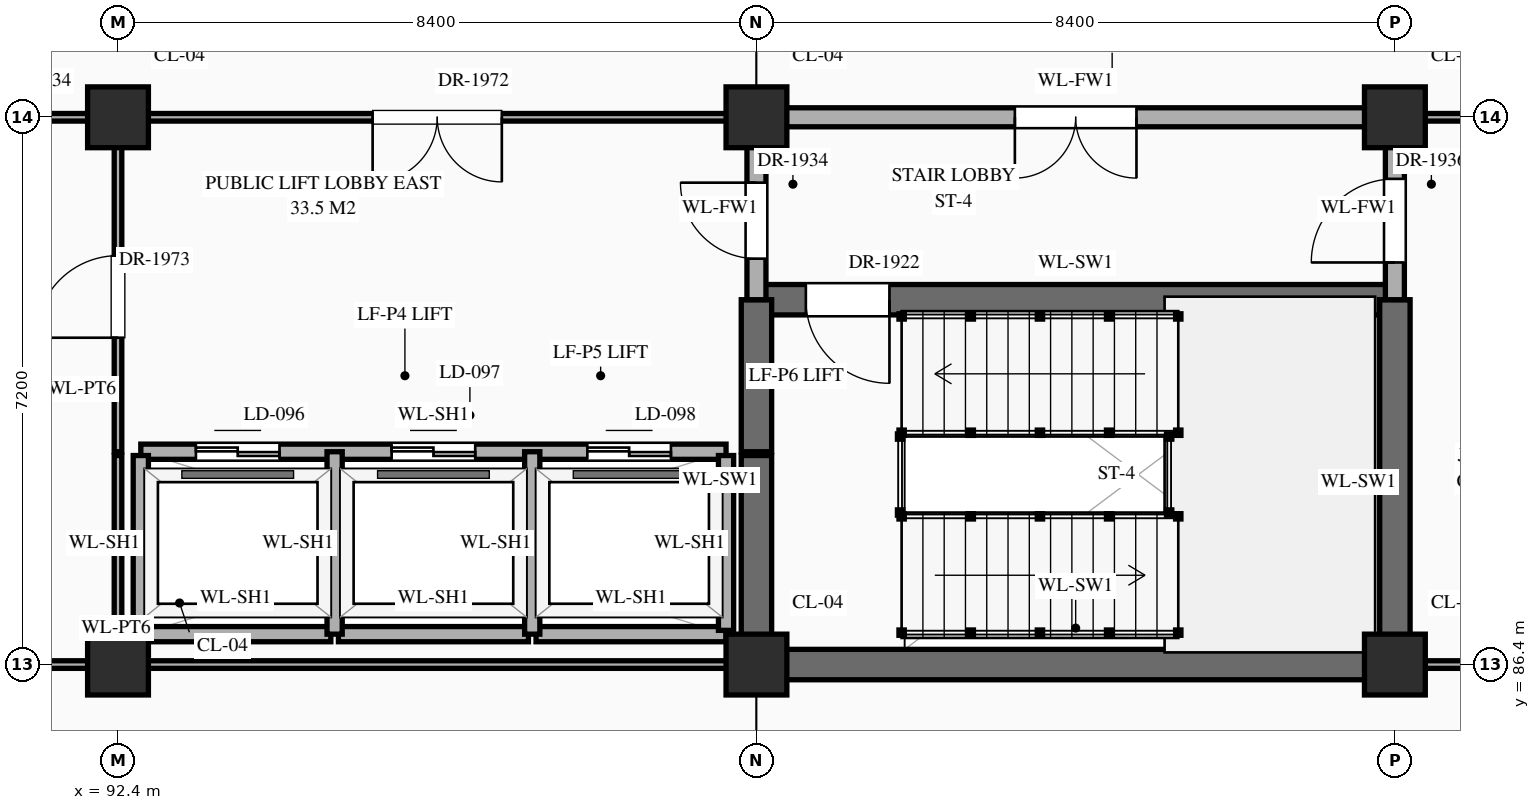
"""IFC4 building model, lengths in metres.
Left out: names, types, materials, properties, quantities, classifications, styles, units other than length and angle.
Written with IfcOpenShell. Run it as: python <this file> out.ifc"""

import sys

from ifc_helpers import new_model, si_unit, direction, frame, frame_2d, origin, origin_2d, place, context, subcontext, project, spatial, rectangle, extrude, element, fill, save


model = new_model("IFC4")
c1 = context("Model", 3, precision=1e-05, world=origin(), true_north=direction((0.0, 1.0)))
c2 = subcontext(c1, "Body", "Model", "MODEL_VIEW")
j1 = project(units=[si_unit("LENGTHUNIT", "METRE"), si_unit("PLANEANGLEUNIT", "RADIAN")], contexts=[c1])
p1 = place(None, origin())
s1 = spatial("IfcSite", under=j1, at=p1, CompositionType="ELEMENT")
p2 = place(p1, origin())
s2 = spatial("IfcBuilding", under=s1, at=p2, CompositionType="ELEMENT")
p3 = place(p2, frame((0.0, 0.0, 21.6)))
s3 = spatial("IfcBuildingStorey", under=s2, at=p3, CompositionType="ELEMENT", Elevation=21.6)
for number, where, z_axis, x_axis in (
    (1, (92.4, 86.4, 0.0), (0.0, 0.0, 1.0), (1.0, 0.0, 0.0)),
    (2, (92.4, 93.6, 0.0), (0.0, 0.0, 1.0), (1.0, 0.0, 0.0)),
    (3, (100.8, 86.4, 0.0), (0.0, 0.0, 1.0), (1.0, 0.0, 0.0)),
    (4, (100.8, 93.6, 0.0), (0.0, 0.0, 1.0), (1.0, 0.0, 0.0)),
    (5, (109.2, 86.4, 0.0), (0.0, 0.0, 1.0), (1.0, 0.0, 0.0)),
    (6, (109.2, 93.6, 0.0), (0.0, 0.0, 1.0), (1.0, 0.0, 0.0)),
):
    element("IfcColumn", number, at=place(p3, frame(where, z_axis=z_axis, x_axis=x_axis)), inside=s3, PredefinedType="COLUMN", context=c2, shape_type="SweptSolid", body=[
        extrude(rectangle(XDim=0.8, YDim=0.8, at=origin_2d()), origin(), (0.0, 0.0, 1.0), 4.5),
    ])
p4 = place(p3, frame((84.0, 86.4, 0.0), z_axis=(0.0, 0.0, 1.0), x_axis=(1.0, 0.0, 0.0)))
e7 = element("IfcWall", 7, at=p4, inside=s3, PredefinedType="STANDARD", context=c2, shape_type="SweptSolid", body=[
    extrude(rectangle(XDim=8.4, YDim=0.1, at=frame_2d((4.2, 0.0))), origin(), (0.0, 0.0, 1.0), 3.39),
])
p5 = place(p4, frame((1.11, 0.0, 0.0)))
e8 = element("IfcOpeningElement", 8, at=p5, cuts=e7, PredefinedType="OPENING", context=c2, shape_type="SweptSolid", body=[
    extrude(rectangle(XDim=0.9, YDim=2.15, at=frame_2d((0.45, 1.075))), frame((0.0, 0.062, 0.0), z_axis=(0.0, -1.0, 0.0), x_axis=(1.0, 0.0, 0.0)), (0.0, 0.0, 1.0), 0.124),
])
p6 = place(p4, frame((3.74, 0.0, 0.0)))
e9 = element("IfcOpeningElement", 9, at=p6, cuts=e7, PredefinedType="OPENING", context=c2, shape_type="SweptSolid", body=[
    extrude(rectangle(XDim=0.92, YDim=2.15, at=frame_2d((0.46, 1.075))), frame((0.0, 0.062, 0.0), z_axis=(0.0, -1.0, 0.0), x_axis=(1.0, 0.0, 0.0)), (0.0, 0.0, 1.0), 0.124),
])
p7 = place(p4, frame((6.36, 0.0, 0.0)))
e10 = element("IfcOpeningElement", 10, at=p7, cuts=e7, PredefinedType="OPENING", context=c2, shape_type="SweptSolid", body=[
    extrude(rectangle(XDim=0.96, YDim=2.2, at=frame_2d((0.48, 1.1))), frame((0.0, 0.062, 0.0), z_axis=(0.0, -1.0, 0.0), x_axis=(1.0, 0.0, 0.0)), (0.0, 0.0, 1.0), 0.124),
])
p8 = place(p3, frame((92.45, 86.4, 0.0), z_axis=(0.0, 0.0, 1.0), x_axis=(1.0, 0.0, 0.0)))
e11 = element("IfcWall", 11, at=p8, inside=s3, PredefinedType="STANDARD", context=c2, shape_type="SweptSolid", body=[
    extrude(rectangle(XDim=8.3, YDim=0.1, at=frame_2d((4.15, 0.0))), origin(), (0.0, 0.0, 1.0), 3.39),
])
p9 = place(p3, frame((100.8, 86.4, 0.0), z_axis=(0.0, 0.0, 1.0), x_axis=(1.0, 0.0, 0.0)))
e12 = element("IfcWall", 12, at=p9, inside=s3, PredefinedType="SHEAR", context=c2, shape_type="SweptSolid", body=[
    extrude(rectangle(XDim=8.4, YDim=0.4, at=frame_2d((4.2, 0.0))), origin(), (0.0, 0.0, 1.0), 4.24),
])
p10 = place(p3, frame((109.2, 86.4, 0.0), z_axis=(0.0, 0.0, 1.0), x_axis=(1.0, 0.0, 0.0)))
e13 = element("IfcWall", 13, at=p10, inside=s3, PredefinedType="STANDARD", context=c2, shape_type="SweptSolid", body=[
    extrude(rectangle(XDim=8.4, YDim=0.1, at=frame_2d((4.2, 0.0))), origin(), (0.0, 0.0, 1.0), 3.39),
])
p11 = place(p10, frame((1.04, 0.0, 0.0)))
e14 = element("IfcOpeningElement", 14, at=p11, cuts=e13, PredefinedType="OPENING", context=c2, shape_type="SweptSolid", body=[
    extrude(rectangle(XDim=1.04, YDim=2.2, at=frame_2d((0.52, 1.1))), frame((0.0, 0.062, 0.0), z_axis=(0.0, -1.0, 0.0), x_axis=(1.0, 0.0, 0.0)), (0.0, 0.0, 1.0), 0.124),
])
p12 = place(p10, frame((3.64, 0.0, 0.0)))
e15 = element("IfcOpeningElement", 15, at=p12, cuts=e13, PredefinedType="OPENING", context=c2, shape_type="SweptSolid", body=[
    extrude(rectangle(XDim=1.12, YDim=2.25, at=frame_2d((0.56, 1.125))), frame((0.0, 0.062, 0.0), z_axis=(0.0, -1.0, 0.0), x_axis=(1.0, 0.0, 0.0)), (0.0, 0.0, 1.0), 0.124),
])
p13 = place(p10, frame((6.26, 0.0, 0.0)))
e16 = element("IfcOpeningElement", 16, at=p13, cuts=e13, PredefinedType="OPENING", context=c2, shape_type="SweptSolid", body=[
    extrude(rectangle(XDim=1.16, YDim=2.3, at=frame_2d((0.58, 1.15))), frame((0.0, 0.062, 0.0), z_axis=(0.0, -1.0, 0.0), x_axis=(1.0, 0.0, 0.0)), (0.0, 0.0, 1.0), 0.124),
])
for number, where, z_axis, x_axis in (
    (17, (92.7, 86.8, 0.0), (0.0, 0.0, 1.0), (1.0, 0.0, 0.0)),
    (18, (95.3, 86.8, 0.0), (0.0, 0.0, 1.0), (1.0, 0.0, 0.0)),
    (19, (97.9, 86.8, 0.0), (0.0, 0.0, 1.0), (1.0, 0.0, 0.0)),
):
    element("IfcWall", number, at=place(p3, frame(where, z_axis=z_axis, x_axis=x_axis)), inside=s3, PredefinedType="STANDARD", context=c2, shape_type="SweptSolid", body=[
        extrude(rectangle(XDim=2.5, YDim=0.2, at=frame_2d((1.25, 0.0))), origin(), (0.0, 0.0, 1.0), 4.24),
    ])
p14 = place(p3, frame((92.7, 89.2, 0.0), z_axis=(0.0, 0.0, 1.0), x_axis=(1.0, 0.0, 0.0)))
e20 = element("IfcWall", 20, at=p14, inside=s3, PredefinedType="STANDARD", context=c2, shape_type="SweptSolid", body=[
    extrude(rectangle(XDim=7.7, YDim=0.2, at=frame_2d((3.85, 0.0))), origin(), (0.0, 0.0, 1.0), 4.24),
])
p15 = place(p14, frame((0.725, 0.0, 0.0)))
e21 = element("IfcOpeningElement", 21, at=p15, cuts=e20, PredefinedType="OPENING", context=c2, shape_type="SweptSolid", body=[
    extrude(rectangle(XDim=1.1, YDim=2.15, at=frame_2d((0.55, 1.075))), frame((0.0, 0.112, 0.0), z_axis=(0.0, -1.0, 0.0), x_axis=(1.0, 0.0, 0.0)), (0.0, 0.0, 1.0), 0.224),
])
p16 = place(p14, frame((3.3, 0.0, 0.0)))
e22 = element("IfcOpeningElement", 22, at=p16, cuts=e20, PredefinedType="OPENING", context=c2, shape_type="SweptSolid", body=[
    extrude(rectangle(XDim=1.1, YDim=2.15, at=frame_2d((0.55, 1.075))), frame((0.0, 0.112, 0.0), z_axis=(0.0, -1.0, 0.0), x_axis=(1.0, 0.0, 0.0)), (0.0, 0.0, 1.0), 0.224),
])
p17 = place(p14, frame((5.875, 0.0, 0.0)))
e23 = element("IfcOpeningElement", 23, at=p17, cuts=e20, PredefinedType="OPENING", context=c2, shape_type="SweptSolid", body=[
    extrude(rectangle(XDim=1.1, YDim=2.15, at=frame_2d((0.55, 1.075))), frame((0.0, 0.112, 0.0), z_axis=(0.0, -1.0, 0.0), x_axis=(1.0, 0.0, 0.0)), (0.0, 0.0, 1.0), 0.224),
])
p18 = place(p3, frame((100.8, 91.2, 0.0), z_axis=(0.0, 0.0, 1.0), x_axis=(1.0, 0.0, 0.0)))
e24 = element("IfcWall", 24, at=p18, inside=s3, PredefinedType="SHEAR", context=c2, shape_type="SweptSolid", body=[
    extrude(rectangle(XDim=8.4, YDim=0.4, at=frame_2d((4.2, 0.0))), origin(), (0.0, 0.0, 1.0), 4.24),
])
p19 = place(p18, frame((0.65, 0.0, 0.0)))
e25 = element("IfcOpeningElement", 25, at=p19, cuts=e24, PredefinedType="OPENING", context=c2, shape_type="SweptSolid", body=[
    extrude(rectangle(XDim=1.1, YDim=2.2, at=frame_2d((0.55, 1.1))), frame((0.0, 0.212, 0.0), z_axis=(0.0, -1.0, 0.0), x_axis=(1.0, 0.0, 0.0)), (0.0, 0.0, 1.0), 0.424),
])
p20 = place(p3, frame((67.2, 93.6, 0.0), z_axis=(0.0, 0.0, 1.0), x_axis=(1.0, 0.0, 0.0)))
e26 = element("IfcWall", 26, at=p20, inside=s3, PredefinedType="STANDARD", context=c2, shape_type="SweptSolid", body=[
    extrude(rectangle(XDim=33.6, YDim=0.1, at=frame_2d((16.8, 0.0))), origin(), (0.0, 0.0, 1.0), 3.39),
])
p21 = place(p20, frame((3.425, 0.0, 0.0)))
e27 = element("IfcOpeningElement", 27, at=p21, cuts=e26, PredefinedType="OPENING", context=c2, shape_type="SweptSolid", body=[
    extrude(rectangle(XDim=1.55, YDim=2.35, at=frame_2d((0.775, 1.175))), frame((0.0, 0.062, 0.0), z_axis=(0.0, -1.0, 0.0), x_axis=(1.0, 0.0, 0.0)), (0.0, 0.0, 1.0), 0.124),
])
p22 = place(p20, frame((28.55, 0.0, 0.0)))
e28 = element("IfcOpeningElement", 28, at=p22, cuts=e26, PredefinedType="OPENING", context=c2, shape_type="SweptSolid", body=[
    extrude(rectangle(XDim=1.7, YDim=2.45, at=frame_2d((0.85, 1.225))), frame((0.0, 0.062, 0.0), z_axis=(0.0, -1.0, 0.0), x_axis=(1.0, 0.0, 0.0)), (0.0, 0.0, 1.0), 0.124),
])
p23 = place(p20, frame((11.825, 0.0, 0.0)))
e29 = element("IfcOpeningElement", 29, at=p23, cuts=e26, PredefinedType="OPENING", context=c2, shape_type="SweptSolid", body=[
    extrude(rectangle(XDim=1.55, YDim=2.35, at=frame_2d((0.775, 1.175))), frame((0.0, 0.062, 0.0), z_axis=(0.0, -1.0, 0.0), x_axis=(1.0, 0.0, 0.0)), (0.0, 0.0, 1.0), 0.124),
])
p24 = place(p20, frame((17.85, 0.0, 0.0)))
e30 = element("IfcOpeningElement", 30, at=p24, cuts=e26, PredefinedType="OPENING", context=c2, shape_type="SweptSolid", body=[
    extrude(rectangle(XDim=1.02, YDim=2.4, at=frame_2d((0.51, 1.2))), frame((0.0, 0.062, 0.0), z_axis=(0.0, -1.0, 0.0), x_axis=(1.0, 0.0, 0.0)), (0.0, 0.0, 1.0), 0.124),
])
p25 = place(p20, frame((20.47, 0.0, 0.0)))
e31 = element("IfcOpeningElement", 31, at=p25, cuts=e26, PredefinedType="OPENING", context=c2, shape_type="SweptSolid", body=[
    extrude(rectangle(XDim=1.06, YDim=2.4, at=frame_2d((0.53, 1.2))), frame((0.0, 0.062, 0.0), z_axis=(0.0, -1.0, 0.0), x_axis=(1.0, 0.0, 0.0)), (0.0, 0.0, 1.0), 0.124),
])
p26 = place(p20, frame((23.07, 0.0, 0.0)))
e32 = element("IfcOpeningElement", 32, at=p26, cuts=e26, PredefinedType="OPENING", context=c2, shape_type="SweptSolid", body=[
    extrude(rectangle(XDim=1.14, YDim=2.4, at=frame_2d((0.57, 1.2))), frame((0.0, 0.062, 0.0), z_axis=(0.0, -1.0, 0.0), x_axis=(1.0, 0.0, 0.0)), (0.0, 0.0, 1.0), 0.124),
])
p27 = place(p3, frame((100.8, 93.6, 0.0), z_axis=(0.0, 0.0, 1.0), x_axis=(1.0, 0.0, 0.0)))
e33 = element("IfcWall", 33, at=p27, inside=s3, PredefinedType="STANDARD", context=c2, shape_type="SweptSolid", body=[
    extrude(rectangle(XDim=8.4, YDim=0.25, at=frame_2d((4.2, 0.0))), origin(), (0.0, 0.0, 1.0), 3.39),
])
p28 = place(p27, frame((3.4, 0.0, 0.0)))
e34 = element("IfcOpeningElement", 34, at=p28, cuts=e33, PredefinedType="OPENING", context=c2, shape_type="SweptSolid", body=[
    extrude(rectangle(XDim=1.6, YDim=2.3, at=frame_2d((0.8, 1.15))), frame((0.0, 0.137, 0.0), z_axis=(0.0, -1.0, 0.0), x_axis=(1.0, 0.0, 0.0)), (0.0, 0.0, 1.0), 0.274),
])
p29 = place(p3, frame((109.2, 93.6, 0.0), z_axis=(0.0, 0.0, 1.0), x_axis=(1.0, 0.0, 0.0)))
e35 = element("IfcWall", 35, at=p29, inside=s3, PredefinedType="STANDARD", context=c2, shape_type="SweptSolid", body=[
    extrude(rectangle(XDim=8.4, YDim=0.1, at=frame_2d((4.2, 0.0))), origin(), (0.0, 0.0, 1.0), 3.39),
])
p30 = place(p29, frame((1.11, 0.0, 0.0)))
e36 = element("IfcOpeningElement", 36, at=p30, cuts=e35, PredefinedType="OPENING", context=c2, shape_type="SweptSolid", body=[
    extrude(rectangle(XDim=0.9, YDim=2.15, at=frame_2d((0.45, 1.075))), frame((0.0, 0.062, 0.0), z_axis=(0.0, -1.0, 0.0), x_axis=(1.0, 0.0, 0.0)), (0.0, 0.0, 1.0), 0.124),
])
p31 = place(p29, frame((3.77, 0.0, 0.0)))
e37 = element("IfcOpeningElement", 37, at=p31, cuts=e35, PredefinedType="OPENING", context=c2, shape_type="SweptSolid", body=[
    extrude(rectangle(XDim=0.86, YDim=2.1, at=frame_2d((0.43, 1.05))), frame((0.0, 0.062, 0.0), z_axis=(0.0, -1.0, 0.0), x_axis=(1.0, 0.0, 0.0)), (0.0, 0.0, 1.0), 0.124),
])
p32 = place(p29, frame((6.38, 0.0, 0.0)))
e38 = element("IfcOpeningElement", 38, at=p32, cuts=e35, PredefinedType="OPENING", context=c2, shape_type="SweptSolid", body=[
    extrude(rectangle(XDim=0.92, YDim=2.15, at=frame_2d((0.46, 1.075))), frame((0.0, 0.062, 0.0), z_axis=(0.0, -1.0, 0.0), x_axis=(1.0, 0.0, 0.0)), (0.0, 0.0, 1.0), 0.124),
])
p33 = place(p3, frame((92.4, 86.45, 0.0), z_axis=(0.0, 0.0, 1.0), x_axis=(0.0, 1.0, 0.0)))
e39 = element("IfcWall", 39, at=p33, inside=s3, PredefinedType="STANDARD", context=c2, shape_type="SweptSolid", body=[
    extrude(rectangle(XDim=2.7, YDim=0.1, at=frame_2d((1.35, 0.0))), origin(), (0.0, 0.0, 1.0), 3.49),
])
p34 = place(p3, frame((92.4, 89.2, 0.0), z_axis=(0.0, 0.0, 1.0), x_axis=(0.0, 1.0, 0.0)))
e40 = element("IfcWall", 40, at=p34, inside=s3, PredefinedType="STANDARD", context=c2, shape_type="SweptSolid", body=[
    extrude(rectangle(XDim=4.4, YDim=0.1, at=frame_2d((2.2, 0.0))), origin(), (0.0, 0.0, 1.0), 3.49),
])
p35 = place(p34, frame((1.5, 0.0, 0.0)))
e41 = element("IfcOpeningElement", 41, at=p35, cuts=e40, PredefinedType="OPENING", context=c2, shape_type="SweptSolid", body=[
    extrude(rectangle(XDim=1.08, YDim=2.25, at=frame_2d((0.54, 1.125))), frame((0.0, 0.062, 0.0), z_axis=(0.0, -1.0, 0.0), x_axis=(1.0, 0.0, 0.0)), (0.0, 0.0, 1.0), 0.124),
])
p36 = place(p3, frame((92.7, 86.85, 0.0), z_axis=(0.0, 0.0, 1.0), x_axis=(0.0, 1.0, 0.0)))
e42 = element("IfcWall", 42, at=p36, inside=s3, PredefinedType="STANDARD", context=c2, shape_type="SweptSolid", body=[
    extrude(rectangle(XDim=2.3, YDim=0.2, at=frame_2d((1.15, 0.0))), origin(), (0.0, 0.0, 1.0), 4.24),
])
for number, where, z_axis, x_axis in (
    (43, (95.25, 86.8, 0.0), (0.0, 0.0, 1.0), (0.0, 1.0, 0.0)),
    (44, (97.85, 86.8, 0.0), (0.0, 0.0, 1.0), (0.0, 1.0, 0.0)),
):
    element("IfcWall", number, at=place(p3, frame(where, z_axis=z_axis, x_axis=x_axis)), inside=s3, PredefinedType="STANDARD", context=c2, shape_type="SweptSolid", body=[
        extrude(rectangle(XDim=2.4, YDim=0.2, at=frame_2d((1.2, 0.0))), origin(), (0.0, 0.0, 1.0), 4.24),
    ])
p37 = place(p3, frame((100.4, 86.85, 0.0), z_axis=(0.0, 0.0, 1.0), x_axis=(0.0, 1.0, 0.0)))
e45 = element("IfcWall", 45, at=p37, inside=s3, PredefinedType="STANDARD", context=c2, shape_type="SweptSolid", body=[
    extrude(rectangle(XDim=2.3, YDim=0.2, at=frame_2d((1.15, 0.0))), origin(), (0.0, 0.0, 1.0), 4.24),
])
p38 = place(p3, frame((100.8, 86.45, 0.0), z_axis=(0.0, 0.0, 1.0), x_axis=(0.0, 1.0, 0.0)))
e46 = element("IfcWall", 46, at=p38, inside=s3, PredefinedType="SHEAR", context=c2, shape_type="SweptSolid", body=[
    extrude(rectangle(XDim=2.7, YDim=0.4, at=frame_2d((1.35, 0.0))), origin(), (0.0, 0.0, 1.0), 4.24),
])
p39 = place(p3, frame((100.8, 89.2, 0.0), z_axis=(0.0, 0.0, 1.0), x_axis=(0.0, 1.0, 0.0)))
e47 = element("IfcWall", 47, at=p39, inside=s3, PredefinedType="SHEAR", context=c2, shape_type="SweptSolid", body=[
    extrude(rectangle(XDim=2.0, YDim=0.4, at=frame_2d((1.0, 0.0))), origin(), (0.0, 0.0, 1.0), 4.24),
])
p40 = place(p3, frame((100.8, 91.2, 0.0), z_axis=(0.0, 0.0, 1.0), x_axis=(0.0, 1.0, 0.0)))
e48 = element("IfcWall", 48, at=p40, inside=s3, PredefinedType="STANDARD", context=c2, shape_type="SweptSolid", body=[
    extrude(rectangle(XDim=2.4, YDim=0.25, at=frame_2d((1.2, 0.0))), origin(), (0.0, 0.0, 1.0), 3.49),
])
p41 = place(p40, frame((0.54, 0.0, 0.0)))
e49 = element("IfcOpeningElement", 49, at=p41, cuts=e48, PredefinedType="OPENING", context=c2, shape_type="SweptSolid", body=[
    extrude(rectangle(XDim=1.0, YDim=2.2, at=frame_2d((0.5, 1.1))), frame((0.0, 0.137, 0.0), z_axis=(0.0, -1.0, 0.0), x_axis=(1.0, 0.0, 0.0)), (0.0, 0.0, 1.0), 0.274),
])
p42 = place(p3, frame((109.2, 86.4, 0.0), z_axis=(0.0, 0.0, 1.0), x_axis=(0.0, 1.0, 0.0)))
e50 = element("IfcWall", 50, at=p42, inside=s3, PredefinedType="SHEAR", context=c2, shape_type="SweptSolid", body=[
    extrude(rectangle(XDim=4.8, YDim=0.4, at=frame_2d((2.4, 0.0))), origin(), (0.0, 0.0, 1.0), 4.24),
])
p43 = place(p3, frame((109.2, 91.2, 0.0), z_axis=(0.0, 0.0, 1.0), x_axis=(0.0, 1.0, 0.0)))
e51 = element("IfcWall", 51, at=p43, inside=s3, PredefinedType="STANDARD", context=c2, shape_type="SweptSolid", body=[
    extrude(rectangle(XDim=2.4, YDim=0.25, at=frame_2d((1.2, 0.0))), origin(), (0.0, 0.0, 1.0), 3.49),
])
p44 = place(p43, frame((0.49, 0.0, 0.0)))
e52 = element("IfcOpeningElement", 52, at=p44, cuts=e51, PredefinedType="OPENING", context=c2, shape_type="SweptSolid", body=[
    extrude(rectangle(XDim=1.1, YDim=2.2, at=frame_2d((0.55, 1.1))), frame((0.0, 0.137, 0.0), z_axis=(0.0, -1.0, 0.0), x_axis=(1.0, 0.0, 0.0)), (0.0, 0.0, 1.0), 0.274),
])
p45 = place(p15, origin())
e53 = element("IfcDoor", 53, at=p45, inside=s3, OperationType="DOUBLE_DOOR_SLIDING", PredefinedType="DOOR", context=c2, shape_type="SweptSolid", body=[
    extrude(rectangle(XDim=1.1, YDim=2.15, at=frame_2d((0.55, 1.075))), frame((0.0, 0.025, 0.0), z_axis=(0.0, -1.0, 0.0), x_axis=(1.0, 0.0, 0.0)), (0.0, 0.0, 1.0), 0.05),
])
fill(e21, e53)
p46 = place(p16, origin())
e54 = element("IfcDoor", 54, at=p46, inside=s3, OperationType="DOUBLE_DOOR_SLIDING", PredefinedType="DOOR", context=c2, shape_type="SweptSolid", body=[
    extrude(rectangle(XDim=1.1, YDim=2.15, at=frame_2d((0.55, 1.075))), frame((0.0, 0.025, 0.0), z_axis=(0.0, -1.0, 0.0), x_axis=(1.0, 0.0, 0.0)), (0.0, 0.0, 1.0), 0.05),
])
fill(e22, e54)
p47 = place(p17, origin())
e55 = element("IfcDoor", 55, at=p47, inside=s3, OperationType="DOUBLE_DOOR_SLIDING", PredefinedType="DOOR", context=c2, shape_type="SweptSolid", body=[
    extrude(rectangle(XDim=1.1, YDim=2.15, at=frame_2d((0.55, 1.075))), frame((0.0, 0.025, 0.0), z_axis=(0.0, -1.0, 0.0), x_axis=(1.0, 0.0, 0.0)), (0.0, 0.0, 1.0), 0.05),
])
fill(e23, e55)
p48 = place(p19, frame((1.1, 0.0, 0.0), z_axis=(0.0, 0.0, 1.0), x_axis=(-1.0, 0.0, 0.0)))
e56 = element("IfcDoor", 56, at=p48, inside=s3, OperationType="SINGLE_SWING_LEFT", PredefinedType="DOOR", context=c2, shape_type="SweptSolid", body=[
    extrude(rectangle(XDim=1.1, YDim=2.2, at=frame_2d((0.55, 1.1))), frame((0.0, 0.025, 0.0), z_axis=(0.0, -1.0, 0.0), x_axis=(1.0, 0.0, 0.0)), (0.0, 0.0, 1.0), 0.05),
])
fill(e25, e56)
p49 = place(p41, origin())
e57 = element("IfcDoor", 57, at=p49, inside=s3, OperationType="SINGLE_SWING_RIGHT", PredefinedType="DOOR", context=c2, shape_type="SweptSolid", body=[
    extrude(rectangle(XDim=1.0, YDim=2.2, at=frame_2d((0.5, 1.1))), frame((0.0, 0.025, 0.0), z_axis=(0.0, -1.0, 0.0), x_axis=(1.0, 0.0, 0.0)), (0.0, 0.0, 1.0), 0.05),
])
fill(e49, e57)
p50 = place(p28, frame((1.6, 0.0, 0.0), z_axis=(0.0, 0.0, 1.0), x_axis=(-1.0, 0.0, 0.0)))
e58 = element("IfcDoor", 58, at=p50, inside=s3, OperationType="DOUBLE_DOOR_SINGLE_SWING", PredefinedType="DOOR", context=c2, shape_type="SweptSolid", body=[
    extrude(rectangle(XDim=1.6, YDim=2.3, at=frame_2d((0.8, 1.15))), frame((0.0, 0.025, 0.0), z_axis=(0.0, -1.0, 0.0), x_axis=(1.0, 0.0, 0.0)), (0.0, 0.0, 1.0), 0.05),
])
fill(e34, e58)
p51 = place(p44, origin())
e59 = element("IfcDoor", 59, at=p51, inside=s3, OperationType="SINGLE_SWING_LEFT", PredefinedType="DOOR", context=c2, shape_type="SweptSolid", body=[
    extrude(rectangle(XDim=1.1, YDim=2.2, at=frame_2d((0.55, 1.1))), frame((0.0, 0.025, 0.0), z_axis=(0.0, -1.0, 0.0), x_axis=(1.0, 0.0, 0.0)), (0.0, 0.0, 1.0), 0.05),
])
fill(e52, e59)
p52 = place(p22, frame((1.7, 0.0, 0.0), z_axis=(0.0, 0.0, 1.0), x_axis=(-1.0, 0.0, 0.0)))
e60 = element("IfcDoor", 60, at=p52, inside=s3, OperationType="DOUBLE_DOOR_SINGLE_SWING", PredefinedType="DOOR", context=c2, shape_type="SweptSolid", body=[
    extrude(rectangle(XDim=1.7, YDim=2.45, at=frame_2d((0.85, 1.225))), frame((0.0, 0.025, 0.0), z_axis=(0.0, -1.0, 0.0), x_axis=(1.0, 0.0, 0.0)), (0.0, 0.0, 1.0), 0.05),
])
fill(e28, e60)
p53 = place(p35, origin())
e61 = element("IfcDoor", 61, at=p53, inside=s3, OperationType="SINGLE_SWING_LEFT", PredefinedType="DOOR", context=c2, shape_type="SweptSolid", body=[
    extrude(rectangle(XDim=1.08, YDim=2.25, at=frame_2d((0.54, 1.125))), frame((0.0, 0.025, 0.0), z_axis=(0.0, -1.0, 0.0), x_axis=(1.0, 0.0, 0.0)), (0.0, 0.0, 1.0), 0.05),
])
fill(e41, e61)
save(model, sys.argv[1])
